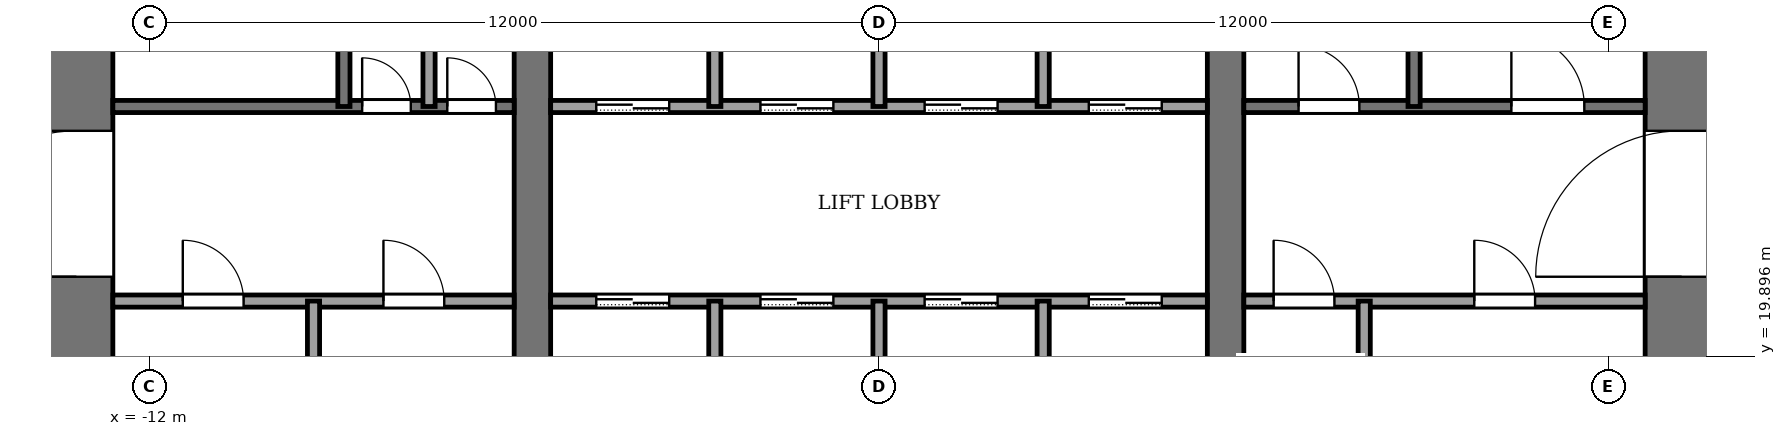
"""IFC4 building model, lengths in metres.
Left out: names, types, materials, properties, quantities, classifications, styles, units other than length and angle.
Written with IfcOpenShell. Run it as: python <this file> out.ifc"""

import sys

from ifc_helpers import new_model, si_unit, direction, frame, frame_2d, origin, place, context, subcontext, project, spatial, rectangle, extrude, element, fill, save


model = new_model("IFC4")
c1 = context("Model", 3, precision=1e-05, world=origin(), true_north=direction((0.0, 1.0)))
c2 = subcontext(c1, "Body", "Model", "MODEL_VIEW")
j1 = project(units=[si_unit("LENGTHUNIT", "METRE"), si_unit("PLANEANGLEUNIT", "RADIAN")], contexts=[c1])
p1 = place(None, origin())
s1 = spatial("IfcSite", under=j1, at=p1, CompositionType="ELEMENT")
p2 = place(p1, origin())
s2 = spatial("IfcBuilding", under=s1, at=p2, CompositionType="ELEMENT")
p3 = place(p2, frame((0.0, 0.0, 94.0)))
s3 = spatial("IfcBuildingStorey", under=s2, at=p3, CompositionType="ELEMENT", Elevation=94.0)
p4 = place(p3, frame((-13.2, 18.4, -0.13), z_axis=(0.0, 0.0, 1.0), x_axis=(0.0, 1.0, 0.0)))
e1 = element("IfcWall", 1, at=p4, inside=s3, PredefinedType="SHEAR", context=c2, shape_type="SweptSolid", body=[
    extrude(rectangle(XDim=19.2, YDim=1.2, at=frame_2d((9.6, 0.0))), origin(), (0.0, 0.0, 1.0), 4.0),
])
p5 = place(p4, frame((2.8, 0.0, 0.13)))
e2 = element("IfcOpeningElement", 2, at=p5, cuts=e1, PredefinedType="OPENING", context=c2, shape_type="SweptSolid", body=[
    extrude(rectangle(XDim=2.4, YDim=2.4, at=frame_2d((1.2, 1.2))), frame((0.0, 0.61, 0.0), z_axis=(0.0, -1.0, 0.0), x_axis=(1.0, 0.0, 0.0)), (0.0, 0.0, 1.0), 1.22),
])
p6 = place(p4, frame((13.4, 0.0, 0.13)))
e3 = element("IfcOpeningElement", 3, at=p6, cuts=e1, PredefinedType="OPENING", context=c2, shape_type="SweptSolid", body=[
    extrude(rectangle(XDim=1.4, YDim=2.2, at=frame_2d((0.7, 1.1))), frame((0.0, 0.61, 0.0), z_axis=(0.0, -1.0, 0.0), x_axis=(1.0, 0.0, 0.0)), (0.0, 0.0, 1.0), 1.22),
])
p7 = place(p3, frame((13.2, 18.4, -0.13), z_axis=(0.0, 0.0, 1.0), x_axis=(0.0, 1.0, 0.0)))
e4 = element("IfcWall", 4, at=p7, inside=s3, PredefinedType="SHEAR", context=c2, shape_type="SweptSolid", body=[
    extrude(rectangle(XDim=19.2, YDim=1.2, at=frame_2d((9.6, 0.0))), origin(), (0.0, 0.0, 1.0), 4.0),
])
p8 = place(p7, frame((2.8, 0.0, 0.13)))
e5 = element("IfcOpeningElement", 5, at=p8, cuts=e4, PredefinedType="OPENING", context=c2, shape_type="SweptSolid", body=[
    extrude(rectangle(XDim=2.4, YDim=2.4, at=frame_2d((1.2, 1.2))), frame((0.0, 0.61, 0.0), z_axis=(0.0, -1.0, 0.0), x_axis=(1.0, 0.0, 0.0)), (0.0, 0.0, 1.0), 1.22),
])
p9 = place(p7, frame((13.3, 0.0, 0.13)))
e6 = element("IfcOpeningElement", 6, at=p9, cuts=e4, PredefinedType="OPENING", context=c2, shape_type="SweptSolid", body=[
    extrude(rectangle(XDim=2.4, YDim=2.4, at=frame_2d((1.2, 1.2))), frame((0.0, 0.61, 0.0), z_axis=(0.0, -1.0, 0.0), x_axis=(1.0, 0.0, 0.0)), (0.0, 0.0, 1.0), 1.22),
])
p10 = place(p3, frame((-5.7, 18.4, -0.13), z_axis=(0.0, 0.0, 1.0), x_axis=(0.0, 1.0, 0.0)))
e7 = element("IfcWall", 7, at=p10, inside=s3, PredefinedType="SHEAR", context=c2, shape_type="SweptSolid", body=[
    extrude(rectangle(XDim=19.2, YDim=0.6, at=frame_2d((9.6, 0.0))), origin(), (0.0, 0.0, 1.0), 4.0),
])
p11 = place(p10, frame((8.35, 0.0, 0.13)))
e8 = element("IfcOpeningElement", 8, at=p11, cuts=e7, PredefinedType="OPENING", context=c2, shape_type="SweptSolid", body=[
    extrude(rectangle(XDim=0.9, YDim=2.1, at=frame_2d((0.45, 1.05))), frame((0.0, 0.31, 0.0), z_axis=(0.0, -1.0, 0.0), x_axis=(1.0, 0.0, 0.0)), (0.0, 0.0, 1.0), 0.62),
])
p12 = place(p3, frame((5.7, 18.4, -0.13), z_axis=(0.0, 0.0, 1.0), x_axis=(0.0, 1.0, 0.0)))
e9 = element("IfcWall", 9, at=p12, inside=s3, PredefinedType="SHEAR", context=c2, shape_type="SweptSolid", body=[
    extrude(rectangle(XDim=19.2, YDim=0.6, at=frame_2d((9.6, 0.0))), origin(), (0.0, 0.0, 1.0), 4.0),
])
p13 = place(p12, frame((8.35, 0.0, 0.13)))
e10 = element("IfcOpeningElement", 10, at=p13, cuts=e9, PredefinedType="OPENING", context=c2, shape_type="SweptSolid", body=[
    extrude(rectangle(XDim=0.9, YDim=2.1, at=frame_2d((0.45, 1.05))), frame((0.0, 0.31, 0.0), z_axis=(0.0, -1.0, 0.0), x_axis=(1.0, 0.0, 0.0)), (0.0, 0.0, 1.0), 0.62),
])
p14 = place(p12, frame((13.3, 0.0, 0.13)))
e11 = element("IfcOpeningElement", 11, at=p14, cuts=e9, PredefinedType="OPENING", context=c2, shape_type="SweptSolid", body=[
    extrude(rectangle(XDim=2.4, YDim=2.4, at=frame_2d((1.2, 1.2))), frame((0.0, 0.31, 0.0), z_axis=(0.0, -1.0, 0.0), x_axis=(1.0, 0.0, 0.0)), (0.0, 0.0, 1.0), 0.62),
])
p15 = place(p3, frame((-12.6, 20.8, 0.0), z_axis=(0.0, 0.0, 1.0), x_axis=(1.0, 0.0, 0.0)))
e12 = element("IfcWall", 12, at=p15, inside=s3, PredefinedType="PARTITIONING", context=c2, shape_type="SweptSolid", body=[
    extrude(rectangle(XDim=6.6, YDim=0.2, at=frame_2d((3.3, 0.0))), origin(), (0.0, 0.0, 1.0), 3.87),
])
p16 = place(p15, frame((1.15, 0.0, 0.0)))
e13 = element("IfcOpeningElement", 13, at=p16, cuts=e12, PredefinedType="OPENING", context=c2, shape_type="SweptSolid", body=[
    extrude(rectangle(XDim=1.0, YDim=2.1, at=frame_2d((0.5, 1.05))), frame((0.0, 0.11, 0.0), z_axis=(0.0, -1.0, 0.0), x_axis=(1.0, 0.0, 0.0)), (0.0, 0.0, 1.0), 0.22),
])
p17 = place(p15, frame((4.45, 0.0, 0.0)))
e14 = element("IfcOpeningElement", 14, at=p17, cuts=e12, PredefinedType="OPENING", context=c2, shape_type="SweptSolid", body=[
    extrude(rectangle(XDim=1.0, YDim=2.1, at=frame_2d((0.5, 1.05))), frame((0.0, 0.11, 0.0), z_axis=(0.0, -1.0, 0.0), x_axis=(1.0, 0.0, 0.0)), (0.0, 0.0, 1.0), 0.22),
])
p18 = place(p3, frame((-5.4, 20.8, 0.0), z_axis=(0.0, 0.0, 1.0), x_axis=(1.0, 0.0, 0.0)))
e15 = element("IfcWall", 15, at=p18, inside=s3, PredefinedType="PARTITIONING", context=c2, shape_type="SweptSolid", body=[
    extrude(rectangle(XDim=10.8, YDim=0.2, at=frame_2d((5.4, 0.0))), origin(), (0.0, 0.0, 1.0), 3.87),
])
p19 = place(p18, frame((0.75, 0.0, 0.0)))
e16 = element("IfcOpeningElement", 16, at=p19, cuts=e15, PredefinedType="OPENING", context=c2, shape_type="SweptSolid", body=[
    extrude(rectangle(XDim=1.2, YDim=2.2, at=frame_2d((0.6, 1.1))), frame((0.0, 0.11, 0.0), z_axis=(0.0, -1.0, 0.0), x_axis=(1.0, 0.0, 0.0)), (0.0, 0.0, 1.0), 0.22),
])
p20 = place(p18, frame((3.45, 0.0, 0.0)))
e17 = element("IfcOpeningElement", 17, at=p20, cuts=e15, PredefinedType="OPENING", context=c2, shape_type="SweptSolid", body=[
    extrude(rectangle(XDim=1.2, YDim=2.2, at=frame_2d((0.6, 1.1))), frame((0.0, 0.11, 0.0), z_axis=(0.0, -1.0, 0.0), x_axis=(1.0, 0.0, 0.0)), (0.0, 0.0, 1.0), 0.22),
])
p21 = place(p18, frame((6.15, 0.0, 0.0)))
e18 = element("IfcOpeningElement", 18, at=p21, cuts=e15, PredefinedType="OPENING", context=c2, shape_type="SweptSolid", body=[
    extrude(rectangle(XDim=1.2, YDim=2.2, at=frame_2d((0.6, 1.1))), frame((0.0, 0.11, 0.0), z_axis=(0.0, -1.0, 0.0), x_axis=(1.0, 0.0, 0.0)), (0.0, 0.0, 1.0), 0.22),
])
p22 = place(p18, frame((8.85, 0.0, 0.0)))
e19 = element("IfcOpeningElement", 19, at=p22, cuts=e15, PredefinedType="OPENING", context=c2, shape_type="SweptSolid", body=[
    extrude(rectangle(XDim=1.2, YDim=2.2, at=frame_2d((0.6, 1.1))), frame((0.0, 0.11, 0.0), z_axis=(0.0, -1.0, 0.0), x_axis=(1.0, 0.0, 0.0)), (0.0, 0.0, 1.0), 0.22),
])
p23 = place(p3, frame((6.0, 20.8, 0.0), z_axis=(0.0, 0.0, 1.0), x_axis=(1.0, 0.0, 0.0)))
e20 = element("IfcWall", 20, at=p23, inside=s3, PredefinedType="PARTITIONING", context=c2, shape_type="SweptSolid", body=[
    extrude(rectangle(XDim=6.6, YDim=0.2, at=frame_2d((3.3, 0.0))), origin(), (0.0, 0.0, 1.0), 3.87),
])
p24 = place(p23, frame((0.49, 0.0, 0.0)))
e21 = element("IfcOpeningElement", 21, at=p24, cuts=e20, PredefinedType="OPENING", context=c2, shape_type="SweptSolid", body=[
    extrude(rectangle(XDim=1.0, YDim=2.1, at=frame_2d((0.5, 1.05))), frame((0.0, 0.11, 0.0), z_axis=(0.0, -1.0, 0.0), x_axis=(1.0, 0.0, 0.0)), (0.0, 0.0, 1.0), 0.22),
])
p25 = place(p23, frame((3.79, 0.0, 0.0)))
e22 = element("IfcOpeningElement", 22, at=p25, cuts=e20, PredefinedType="OPENING", context=c2, shape_type="SweptSolid", body=[
    extrude(rectangle(XDim=1.0, YDim=2.1, at=frame_2d((0.5, 1.05))), frame((0.0, 0.11, 0.0), z_axis=(0.0, -1.0, 0.0), x_axis=(1.0, 0.0, 0.0)), (0.0, 0.0, 1.0), 0.22),
])
p26 = place(p3, frame((-12.6, 24.0, 0.0), z_axis=(0.0, 0.0, 1.0), x_axis=(1.0, 0.0, 0.0)))
e23 = element("IfcWall", 23, at=p26, inside=s3, PredefinedType="PARTITIONING", context=c2, shape_type="SweptSolid", body=[
    extrude(rectangle(XDim=6.6, YDim=0.2, at=frame_2d((3.3, 0.0))), origin(), (0.0, 0.0, 1.0), 3.87),
])
p27 = place(p26, frame((4.1, 0.0, 0.0)))
e24 = element("IfcOpeningElement", 24, at=p27, cuts=e23, PredefinedType="OPENING", context=c2, shape_type="SweptSolid", body=[
    extrude(rectangle(XDim=0.8, YDim=2.1, at=frame_2d((0.4, 1.05))), frame((0.0, 0.11, 0.0), z_axis=(0.0, -1.0, 0.0), x_axis=(1.0, 0.0, 0.0)), (0.0, 0.0, 1.0), 0.22),
])
p28 = place(p26, frame((5.5, 0.0, 0.0)))
e25 = element("IfcOpeningElement", 25, at=p28, cuts=e23, PredefinedType="OPENING", context=c2, shape_type="SweptSolid", body=[
    extrude(rectangle(XDim=0.8, YDim=2.1, at=frame_2d((0.4, 1.05))), frame((0.0, 0.11, 0.0), z_axis=(0.0, -1.0, 0.0), x_axis=(1.0, 0.0, 0.0)), (0.0, 0.0, 1.0), 0.22),
])
p29 = place(p3, frame((-5.4, 24.0, 0.0), z_axis=(0.0, 0.0, 1.0), x_axis=(1.0, 0.0, 0.0)))
e26 = element("IfcWall", 26, at=p29, inside=s3, PredefinedType="PARTITIONING", context=c2, shape_type="SweptSolid", body=[
    extrude(rectangle(XDim=10.8, YDim=0.2, at=frame_2d((5.4, 0.0))), origin(), (0.0, 0.0, 1.0), 3.87),
])
p30 = place(p29, frame((0.75, 0.0, 0.0)))
e27 = element("IfcOpeningElement", 27, at=p30, cuts=e26, PredefinedType="OPENING", context=c2, shape_type="SweptSolid", body=[
    extrude(rectangle(XDim=1.2, YDim=2.2, at=frame_2d((0.6, 1.1))), frame((0.0, 0.11, 0.0), z_axis=(0.0, -1.0, 0.0), x_axis=(1.0, 0.0, 0.0)), (0.0, 0.0, 1.0), 0.22),
])
p31 = place(p29, frame((3.45, 0.0, 0.0)))
e28 = element("IfcOpeningElement", 28, at=p31, cuts=e26, PredefinedType="OPENING", context=c2, shape_type="SweptSolid", body=[
    extrude(rectangle(XDim=1.2, YDim=2.2, at=frame_2d((0.6, 1.1))), frame((0.0, 0.11, 0.0), z_axis=(0.0, -1.0, 0.0), x_axis=(1.0, 0.0, 0.0)), (0.0, 0.0, 1.0), 0.22),
])
p32 = place(p29, frame((6.15, 0.0, 0.0)))
e29 = element("IfcOpeningElement", 29, at=p32, cuts=e26, PredefinedType="OPENING", context=c2, shape_type="SweptSolid", body=[
    extrude(rectangle(XDim=1.2, YDim=2.2, at=frame_2d((0.6, 1.1))), frame((0.0, 0.11, 0.0), z_axis=(0.0, -1.0, 0.0), x_axis=(1.0, 0.0, 0.0)), (0.0, 0.0, 1.0), 0.22),
])
p33 = place(p29, frame((8.85, 0.0, 0.0)))
e30 = element("IfcOpeningElement", 30, at=p33, cuts=e26, PredefinedType="OPENING", context=c2, shape_type="SweptSolid", body=[
    extrude(rectangle(XDim=1.2, YDim=2.2, at=frame_2d((0.6, 1.1))), frame((0.0, 0.11, 0.0), z_axis=(0.0, -1.0, 0.0), x_axis=(1.0, 0.0, 0.0)), (0.0, 0.0, 1.0), 0.22),
])
p34 = place(p3, frame((6.0, 24.0, 0.0), z_axis=(0.0, 0.0, 1.0), x_axis=(1.0, 0.0, 0.0)))
e31 = element("IfcWall", 31, at=p34, inside=s3, PredefinedType="PARTITIONING", context=c2, shape_type="SweptSolid", body=[
    extrude(rectangle(XDim=6.6, YDim=0.2, at=frame_2d((3.3, 0.0))), origin(), (0.0, 0.0, 1.0), 3.87),
])
p35 = place(p34, frame((0.9, 0.0, 0.0)))
e32 = element("IfcOpeningElement", 32, at=p35, cuts=e31, PredefinedType="OPENING", context=c2, shape_type="SweptSolid", body=[
    extrude(rectangle(XDim=1.0, YDim=2.1, at=frame_2d((0.5, 1.05))), frame((0.0, 0.11, 0.0), z_axis=(0.0, -1.0, 0.0), x_axis=(1.0, 0.0, 0.0)), (0.0, 0.0, 1.0), 0.22),
])
p36 = place(p34, frame((4.4, 0.0, 0.0)))
e33 = element("IfcOpeningElement", 33, at=p36, cuts=e31, PredefinedType="OPENING", context=c2, shape_type="SweptSolid", body=[
    extrude(rectangle(XDim=1.2, YDim=2.2, at=frame_2d((0.6, 1.1))), frame((0.0, 0.11, 0.0), z_axis=(0.0, -1.0, 0.0), x_axis=(1.0, 0.0, 0.0)), (0.0, 0.0, 1.0), 0.22),
])
p37 = place(p3, frame((-9.3, 18.4, 0.0), z_axis=(0.0, 0.0, 1.0), x_axis=(0.0, 1.0, 0.0)))
e34 = element("IfcWall", 34, at=p37, inside=s3, PredefinedType="PARTITIONING", context=c2, shape_type="SweptSolid", body=[
    extrude(rectangle(XDim=2.4, YDim=0.2, at=frame_2d((1.2, 0.0))), origin(), (0.0, 0.0, 1.0), 3.87),
])
for number, where, z_axis, x_axis in (
    (35, (-8.8, 24.0, 0.0), (0.0, 0.0, 1.0), (0.0, 1.0, 0.0)),
    (36, (-7.4, 24.0, 0.0), (0.0, 0.0, 1.0), (0.0, 1.0, 0.0)),
):
    element("IfcWall", number, at=place(p3, frame(where, z_axis=z_axis, x_axis=x_axis)), inside=s3, PredefinedType="PARTITIONING", context=c2, shape_type="SweptSolid", body=[
        extrude(rectangle(XDim=7.4, YDim=0.2, at=frame_2d((3.7, 0.0))), origin(), (0.0, 0.0, 1.0), 3.87),
    ])
p38 = place(p3, frame((-2.7, 18.4, 0.0), z_axis=(0.0, 0.0, 1.0), x_axis=(0.0, 1.0, 0.0)))
e37 = element("IfcWall", 37, at=p38, inside=s3, PredefinedType="PARTITIONING", context=c2, shape_type="SweptSolid", body=[
    extrude(rectangle(XDim=2.4, YDim=0.2, at=frame_2d((1.2, 0.0))), origin(), (0.0, 0.0, 1.0), 3.87),
])
p39 = place(p3, frame((-2.7, 24.0, 0.0), z_axis=(0.0, 0.0, 1.0), x_axis=(0.0, 1.0, 0.0)))
e38 = element("IfcWall", 38, at=p39, inside=s3, PredefinedType="PARTITIONING", context=c2, shape_type="SweptSolid", body=[
    extrude(rectangle(XDim=2.4, YDim=0.2, at=frame_2d((1.2, 0.0))), origin(), (0.0, 0.0, 1.0), 3.87),
])
p40 = place(p3, frame((0.0, 18.4, 0.0), z_axis=(0.0, 0.0, 1.0), x_axis=(0.0, 1.0, 0.0)))
e39 = element("IfcWall", 39, at=p40, inside=s3, PredefinedType="PARTITIONING", context=c2, shape_type="SweptSolid", body=[
    extrude(rectangle(XDim=2.4, YDim=0.2, at=frame_2d((1.2, 0.0))), origin(), (0.0, 0.0, 1.0), 3.87),
])
p41 = place(p3, frame((0.0, 24.0, 0.0), z_axis=(0.0, 0.0, 1.0), x_axis=(0.0, 1.0, 0.0)))
e40 = element("IfcWall", 40, at=p41, inside=s3, PredefinedType="PARTITIONING", context=c2, shape_type="SweptSolid", body=[
    extrude(rectangle(XDim=6.4, YDim=0.2, at=frame_2d((3.2, 0.0))), origin(), (0.0, 0.0, 1.0), 3.87),
])
p42 = place(p3, frame((2.7, 18.4, 0.0), z_axis=(0.0, 0.0, 1.0), x_axis=(0.0, 1.0, 0.0)))
e41 = element("IfcWall", 41, at=p42, inside=s3, PredefinedType="PARTITIONING", context=c2, shape_type="SweptSolid", body=[
    extrude(rectangle(XDim=2.4, YDim=0.2, at=frame_2d((1.2, 0.0))), origin(), (0.0, 0.0, 1.0), 3.87),
])
p43 = place(p3, frame((2.7, 24.0, 0.0), z_axis=(0.0, 0.0, 1.0), x_axis=(0.0, 1.0, 0.0)))
e42 = element("IfcWall", 42, at=p43, inside=s3, PredefinedType="PARTITIONING", context=c2, shape_type="SweptSolid", body=[
    extrude(rectangle(XDim=2.4, YDim=0.2, at=frame_2d((1.2, 0.0))), origin(), (0.0, 0.0, 1.0), 3.87),
])
p44 = place(p3, frame((7.98, 18.4, 0.0), z_axis=(0.0, 0.0, 1.0), x_axis=(0.0, 1.0, 0.0)))
e43 = element("IfcWall", 43, at=p44, inside=s3, PredefinedType="PARTITIONING", context=c2, shape_type="SweptSolid", body=[
    extrude(rectangle(XDim=2.4, YDim=0.2, at=frame_2d((1.2, 0.0))), origin(), (0.0, 0.0, 1.0), 3.87),
])
p45 = place(p3, frame((8.8, 24.0, 0.0), z_axis=(0.0, 0.0, 1.0), x_axis=(0.0, 1.0, 0.0)))
e44 = element("IfcWall", 44, at=p45, inside=s3, PredefinedType="PARTITIONING", context=c2, shape_type="SweptSolid", body=[
    extrude(rectangle(XDim=7.4, YDim=0.2, at=frame_2d((3.7, 0.0))), origin(), (0.0, 0.0, 1.0), 3.87),
])
p46 = place(p19, origin())
e45 = element("IfcDoor", 45, at=p46, inside=s3, OperationType="SLIDING_TO_LEFT", PredefinedType="DOOR", context=c2, shape_type="SweptSolid", body=[
    extrude(rectangle(XDim=1.2, YDim=2.2, at=frame_2d((0.6, 1.1))), frame((0.0, 0.025, 0.0), z_axis=(0.0, -1.0, 0.0), x_axis=(1.0, 0.0, 0.0)), (0.0, 0.0, 1.0), 0.05),
])
fill(e16, e45)
p47 = place(p20, origin())
e46 = element("IfcDoor", 46, at=p47, inside=s3, OperationType="SLIDING_TO_LEFT", PredefinedType="DOOR", context=c2, shape_type="SweptSolid", body=[
    extrude(rectangle(XDim=1.2, YDim=2.2, at=frame_2d((0.6, 1.1))), frame((0.0, 0.025, 0.0), z_axis=(0.0, -1.0, 0.0), x_axis=(1.0, 0.0, 0.0)), (0.0, 0.0, 1.0), 0.05),
])
fill(e17, e46)
p48 = place(p21, origin())
e47 = element("IfcDoor", 47, at=p48, inside=s3, OperationType="SLIDING_TO_LEFT", PredefinedType="DOOR", context=c2, shape_type="SweptSolid", body=[
    extrude(rectangle(XDim=1.2, YDim=2.2, at=frame_2d((0.6, 1.1))), frame((0.0, 0.025, 0.0), z_axis=(0.0, -1.0, 0.0), x_axis=(1.0, 0.0, 0.0)), (0.0, 0.0, 1.0), 0.05),
])
fill(e18, e47)
p49 = place(p22, origin())
e48 = element("IfcDoor", 48, at=p49, inside=s3, OperationType="SLIDING_TO_LEFT", PredefinedType="DOOR", context=c2, shape_type="SweptSolid", body=[
    extrude(rectangle(XDim=1.2, YDim=2.2, at=frame_2d((0.6, 1.1))), frame((0.0, 0.025, 0.0), z_axis=(0.0, -1.0, 0.0), x_axis=(1.0, 0.0, 0.0)), (0.0, 0.0, 1.0), 0.05),
])
fill(e19, e48)
p50 = place(p30, origin())
e49 = element("IfcDoor", 49, at=p50, inside=s3, OperationType="SLIDING_TO_LEFT", PredefinedType="DOOR", context=c2, shape_type="SweptSolid", body=[
    extrude(rectangle(XDim=1.2, YDim=2.2, at=frame_2d((0.6, 1.1))), frame((0.0, 0.025, 0.0), z_axis=(0.0, -1.0, 0.0), x_axis=(1.0, 0.0, 0.0)), (0.0, 0.0, 1.0), 0.05),
])
fill(e27, e49)
p51 = place(p31, origin())
e50 = element("IfcDoor", 50, at=p51, inside=s3, OperationType="SLIDING_TO_LEFT", PredefinedType="DOOR", context=c2, shape_type="SweptSolid", body=[
    extrude(rectangle(XDim=1.2, YDim=2.2, at=frame_2d((0.6, 1.1))), frame((0.0, 0.025, 0.0), z_axis=(0.0, -1.0, 0.0), x_axis=(1.0, 0.0, 0.0)), (0.0, 0.0, 1.0), 0.05),
])
fill(e28, e50)
p52 = place(p32, origin())
e51 = element("IfcDoor", 51, at=p52, inside=s3, OperationType="SLIDING_TO_LEFT", PredefinedType="DOOR", context=c2, shape_type="SweptSolid", body=[
    extrude(rectangle(XDim=1.2, YDim=2.2, at=frame_2d((0.6, 1.1))), frame((0.0, 0.025, 0.0), z_axis=(0.0, -1.0, 0.0), x_axis=(1.0, 0.0, 0.0)), (0.0, 0.0, 1.0), 0.05),
])
fill(e29, e51)
p53 = place(p33, origin())
e52 = element("IfcDoor", 52, at=p53, inside=s3, OperationType="SLIDING_TO_LEFT", PredefinedType="DOOR", context=c2, shape_type="SweptSolid", body=[
    extrude(rectangle(XDim=1.2, YDim=2.2, at=frame_2d((0.6, 1.1))), frame((0.0, 0.025, 0.0), z_axis=(0.0, -1.0, 0.0), x_axis=(1.0, 0.0, 0.0)), (0.0, 0.0, 1.0), 0.05),
])
fill(e30, e52)
p54 = place(p16, origin())
e53 = element("IfcDoor", 53, at=p54, inside=s3, OperationType="SINGLE_SWING_LEFT", PredefinedType="DOOR", context=c2, shape_type="SweptSolid", body=[
    extrude(rectangle(XDim=1.0, YDim=2.1, at=frame_2d((0.5, 1.05))), frame((0.0, 0.025, 0.0), z_axis=(0.0, -1.0, 0.0), x_axis=(1.0, 0.0, 0.0)), (0.0, 0.0, 1.0), 0.05),
])
fill(e13, e53)
p55 = place(p17, origin())
e54 = element("IfcDoor", 54, at=p55, inside=s3, OperationType="SINGLE_SWING_LEFT", PredefinedType="DOOR", context=c2, shape_type="SweptSolid", body=[
    extrude(rectangle(XDim=1.0, YDim=2.1, at=frame_2d((0.5, 1.05))), frame((0.0, 0.025, 0.0), z_axis=(0.0, -1.0, 0.0), x_axis=(1.0, 0.0, 0.0)), (0.0, 0.0, 1.0), 0.05),
])
fill(e14, e54)
p56 = place(p24, origin())
e55 = element("IfcDoor", 55, at=p56, inside=s3, OperationType="SINGLE_SWING_RIGHT", PredefinedType="DOOR", context=c2, shape_type="SweptSolid", body=[
    extrude(rectangle(XDim=1.0, YDim=2.1, at=frame_2d((0.5, 1.05))), frame((0.0, 0.025, 0.0), z_axis=(0.0, -1.0, 0.0), x_axis=(1.0, 0.0, 0.0)), (0.0, 0.0, 1.0), 0.05),
])
fill(e21, e55)
p57 = place(p25, origin())
e56 = element("IfcDoor", 56, at=p57, inside=s3, OperationType="SINGLE_SWING_RIGHT", PredefinedType="DOOR", context=c2, shape_type="SweptSolid", body=[
    extrude(rectangle(XDim=1.0, YDim=2.1, at=frame_2d((0.5, 1.05))), frame((0.0, 0.025, 0.0), z_axis=(0.0, -1.0, 0.0), x_axis=(1.0, 0.0, 0.0)), (0.0, 0.0, 1.0), 0.05),
])
fill(e22, e56)
p58 = place(p27, origin())
e57 = element("IfcDoor", 57, at=p58, inside=s3, OperationType="SINGLE_SWING_LEFT", PredefinedType="DOOR", context=c2, shape_type="SweptSolid", body=[
    extrude(rectangle(XDim=0.8, YDim=2.1, at=frame_2d((0.4, 1.05))), frame((0.0, 0.025, 0.0), z_axis=(0.0, -1.0, 0.0), x_axis=(1.0, 0.0, 0.0)), (0.0, 0.0, 1.0), 0.05),
])
fill(e24, e57)
p59 = place(p28, origin())
e58 = element("IfcDoor", 58, at=p59, inside=s3, OperationType="SINGLE_SWING_RIGHT", PredefinedType="DOOR", context=c2, shape_type="SweptSolid", body=[
    extrude(rectangle(XDim=0.8, YDim=2.1, at=frame_2d((0.4, 1.05))), frame((0.0, 0.025, 0.0), z_axis=(0.0, -1.0, 0.0), x_axis=(1.0, 0.0, 0.0)), (0.0, 0.0, 1.0), 0.05),
])
fill(e25, e58)
p60 = place(p35, origin())
e59 = element("IfcDoor", 59, at=p60, inside=s3, OperationType="SINGLE_SWING_RIGHT", PredefinedType="DOOR", context=c2, shape_type="SweptSolid", body=[
    extrude(rectangle(XDim=1.0, YDim=2.1, at=frame_2d((0.5, 1.05))), frame((0.0, 0.025, 0.0), z_axis=(0.0, -1.0, 0.0), x_axis=(1.0, 0.0, 0.0)), (0.0, 0.0, 1.0), 0.05),
])
fill(e32, e59)
p61 = place(p36, origin())
e60 = element("IfcDoor", 60, at=p61, inside=s3, OperationType="SINGLE_SWING_LEFT", PredefinedType="DOOR", context=c2, shape_type="SweptSolid", body=[
    extrude(rectangle(XDim=1.2, YDim=2.2, at=frame_2d((0.6, 1.1))), frame((0.0, 0.025, 0.0), z_axis=(0.0, -1.0, 0.0), x_axis=(1.0, 0.0, 0.0)), (0.0, 0.0, 1.0), 0.05),
])
fill(e33, e60)
p62 = place(p5, origin())
e61 = element("IfcDoor", 61, at=p62, inside=s3, OperationType="DOUBLE_DOOR_SINGLE_SWING", PredefinedType="DOOR", context=c2, shape_type="SweptSolid", body=[
    extrude(rectangle(XDim=2.4, YDim=2.4, at=frame_2d((1.2, 1.2))), frame((0.0, 0.025, 0.0), z_axis=(0.0, -1.0, 0.0), x_axis=(1.0, 0.0, 0.0)), (0.0, 0.0, 1.0), 0.05),
])
fill(e2, e61)
p63 = place(p8, origin())
e62 = element("IfcDoor", 62, at=p63, inside=s3, OperationType="DOUBLE_DOOR_SINGLE_SWING", PredefinedType="DOOR", context=c2, shape_type="SweptSolid", body=[
    extrude(rectangle(XDim=2.4, YDim=2.4, at=frame_2d((1.2, 1.2))), frame((0.0, 0.025, 0.0), z_axis=(0.0, -1.0, 0.0), x_axis=(1.0, 0.0, 0.0)), (0.0, 0.0, 1.0), 0.05),
])
fill(e5, e62)
save(model, sys.argv[1])
